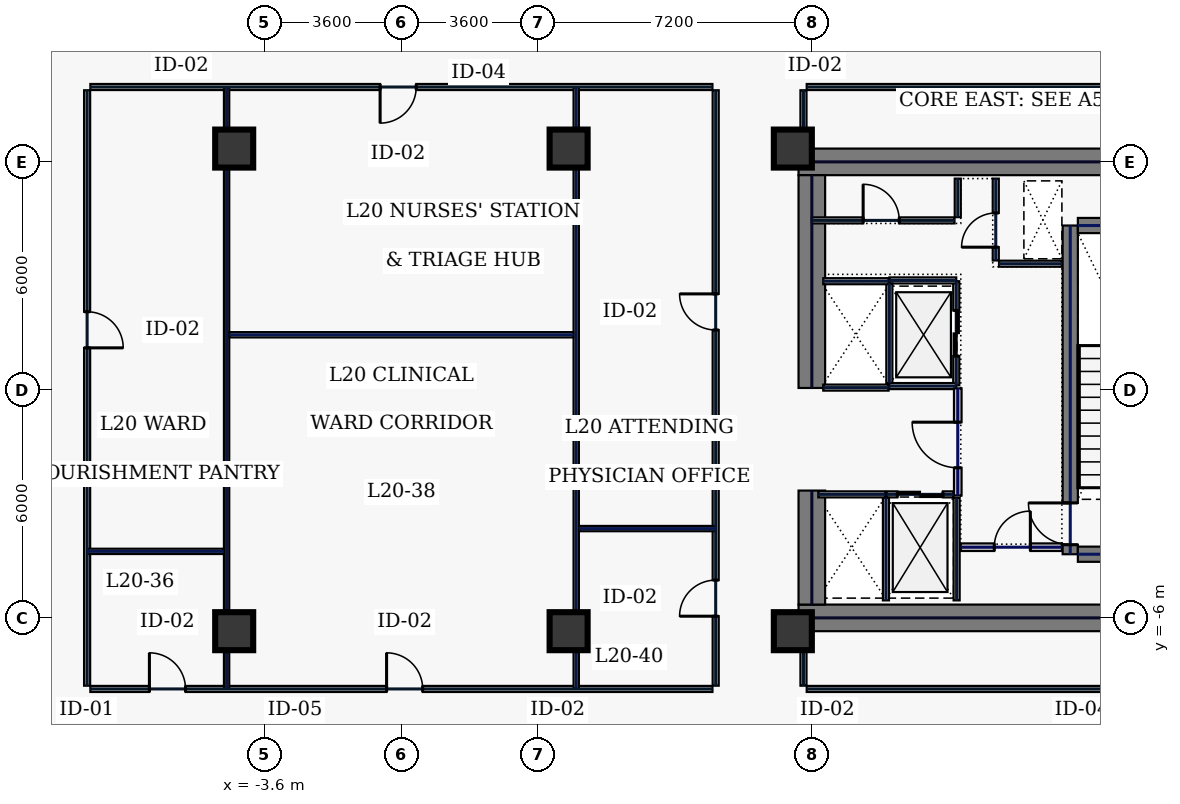
"""IFC4 building model, lengths in metres.
Left out: names, types, materials, properties, quantities, classifications, styles, units other than length and angle.
Written with IfcOpenShell. Run it as: python <this file> out.ifc"""

import sys

from ifc_helpers import new_model, si_unit, direction, frame, frame_2d, origin, origin_2d, place, context, subcontext, project, spatial, rectangle, hollow_rectangle, extrude, element, fill, save


model = new_model("IFC4")
c1 = context("Model", 3, precision=1e-05, world=origin(), true_north=direction((0.0, 1.0)))
c2 = subcontext(c1, "Body", "Model", "MODEL_VIEW")
j1 = project(units=[si_unit("LENGTHUNIT", "METRE"), si_unit("PLANEANGLEUNIT", "RADIAN")], contexts=[c1])
p1 = place(None, origin())
s1 = spatial("IfcSite", under=j1, at=p1, CompositionType="ELEMENT")
p2 = place(p1, origin())
s2 = spatial("IfcBuilding", under=s1, at=p2, CompositionType="ELEMENT")
p3 = place(p2, frame((0.0, 0.0, 93.4)))
s3 = spatial("IfcBuildingStorey", under=s2, at=p3, CompositionType="ELEMENT", Elevation=93.4)
for number, where, z_axis, x_axis in (
    (1, (10.45, 6.0, 0.0), (0.0, 0.0, 1.0), (1.0, 0.0, 0.0)),
    (2, (10.45, -6.0, 0.0), (0.0, 0.0, 1.0), (1.0, 0.0, 0.0)),
):
    element("IfcWall", number, at=place(p3, frame(where, z_axis=z_axis, x_axis=x_axis)), inside=s3, PredefinedType="SHEAR", context=c2, shape_type="SweptSolid", body=[
        extrude(rectangle(XDim=11.55, YDim=0.7, at=frame_2d((5.775, 0.0))), origin(), (0.0, 0.0, 1.0), 3.74),
    ])
p4 = place(p3, frame((10.8, -5.65, 0.0), z_axis=(0.0, 0.0, 1.0), x_axis=(0.0, 1.0, 0.0)))
e3 = element("IfcWall", 3, at=p4, inside=s3, PredefinedType="SHEAR", context=c2, shape_type="SweptSolid", body=[
    extrude(rectangle(XDim=3.0, YDim=0.7, at=frame_2d((1.5, 0.0))), origin(), (0.0, 0.0, 1.0), 3.74),
])
p5 = place(p3, frame((10.8, 0.05, 0.0), z_axis=(0.0, 0.0, 1.0), x_axis=(0.0, 1.0, 0.0)))
e4 = element("IfcWall", 4, at=p5, inside=s3, PredefinedType="SHEAR", context=c2, shape_type="SweptSolid", body=[
    extrude(rectangle(XDim=5.6, YDim=0.7, at=frame_2d((2.8, 0.0))), origin(), (0.0, 0.0, 1.0), 3.74),
])
p6 = place(p3, frame((17.6, -4.325, 0.0), z_axis=(0.0, 0.0, 1.0), x_axis=(0.0, 1.0, 0.0)))
e5 = element("IfcWall", 5, at=p6, inside=s3, PredefinedType="SHEAR", context=c2, shape_type="SweptSolid", body=[
    extrude(rectangle(XDim=8.65, YDim=0.4, at=frame_2d((4.325, 0.0))), origin(), (0.0, 0.0, 1.0), 3.74),
])
p7 = place(p6, frame((0.25, 0.0, 0.0)))
e6 = element("IfcOpeningElement", 6, at=p7, cuts=e5, PredefinedType="OPENING", context=c2, shape_type="SweptSolid", body=[
    extrude(rectangle(XDim=1.1, YDim=2.2, at=frame_2d((0.55, 1.1))), frame((0.0, 0.21, 0.0), z_axis=(0.0, -1.0, 0.0), x_axis=(1.0, 0.0, 0.0)), (0.0, 0.0, 1.0), 0.42),
])
for number, where, z_axis, x_axis in (
    (7, (17.8, -4.325, 0.0), (0.0, 0.0, 1.0), (1.0, 0.0, 0.0)),
    (8, (17.8, 4.325, 0.0), (0.0, 0.0, 1.0), (1.0, 0.0, 0.0)),
):
    element("IfcWall", number, at=place(p3, frame(where, z_axis=z_axis, x_axis=x_axis)), inside=s3, PredefinedType="SHEAR", context=c2, shape_type="SweptSolid", body=[
        extrude(rectangle(XDim=3.4, YDim=0.4, at=frame_2d((1.7, 0.0))), origin(), (0.0, 0.0, 1.0), 3.74),
    ])
for number, where, z_axis, x_axis in (
    (9, (10.3, -6.35, 0.0), (0.0, 0.0, 1.0), (1.0, 0.0, 0.0)),
    (10, (10.3, 6.35, 0.0), (0.0, 0.0, 1.0), (1.0, 0.0, 0.0)),
    (11, (-4.4, -6.35, 0.0), (0.0, 0.0, 1.0), (1.0, 0.0, 0.0)),
    (12, (4.4, -6.35, 0.0), (0.0, 0.0, 1.0), (1.0, 0.0, 0.0)),
    (13, (-4.4, 6.35, 0.0), (0.0, 0.0, 1.0), (1.0, 0.0, 0.0)),
    (14, (4.4, 6.35, 0.0), (0.0, 0.0, 1.0), (1.0, 0.0, 0.0)),
):
    element("IfcColumn", number, at=place(p3, frame(where, z_axis=z_axis, x_axis=x_axis)), inside=s3, PredefinedType="COLUMN", context=c2, shape_type="SweptSolid", body=[
        extrude(hollow_rectangle(XDim=1.0, YDim=1.0, WallThickness=0.045, at=origin_2d()), origin(), (0.0, 0.0, 1.0), 3.74),
    ])
p8 = place(p3, frame((14.6, 0.12, 0.0), z_axis=(0.0, 0.0, 1.0), x_axis=(0.0, 1.0, 0.0)))
e15 = element("IfcWall", 15, at=p8, inside=s3, PredefinedType="PARTITIONING", context=c2, shape_type="SweptSolid", body=[
    extrude(rectangle(XDim=2.74, YDim=0.16, at=frame_2d((1.37, 0.0))), origin(), (0.0, 0.0, 1.0), 3.74),
])
p9 = place(p8, frame((0.77, 0.0, 0.0)))
e16 = element("IfcOpeningElement", 16, at=p9, cuts=e15, PredefinedType="OPENING", context=c2, shape_type="SweptSolid", body=[
    extrude(rectangle(XDim=1.2, YDim=2.2, at=frame_2d((0.6, 1.1))), frame((0.0, 0.09, 0.0), z_axis=(0.0, -1.0, 0.0), x_axis=(1.0, 0.0, 0.0)), (0.0, 0.0, 1.0), 0.18),
])
for number, where, z_axis, x_axis in (
    (17, (12.84, 0.1, 0.0), (0.0, 0.0, 1.0), (1.0, 0.0, 0.0)),
    (18, (12.84, 2.88, 0.0), (0.0, 0.0, 1.0), (1.0, 0.0, 0.0)),
):
    element("IfcWall", number, at=place(p3, frame(where, z_axis=z_axis, x_axis=x_axis)), inside=s3, PredefinedType="PARTITIONING", context=c2, shape_type="SweptSolid", body=[
        extrude(rectangle(XDim=1.76, YDim=0.16, at=frame_2d((0.88, 0.0))), origin(), (0.0, 0.0, 1.0), 3.74),
    ])
p10 = place(p3, frame((12.84, 0.18, 0.0), z_axis=(0.0, 0.0, 1.0), x_axis=(0.0, 1.0, 0.0)))
e19 = element("IfcWall", 19, at=p10, inside=s3, PredefinedType="PARTITIONING", context=c2, shape_type="SweptSolid", body=[
    extrude(rectangle(XDim=2.62, YDim=0.16, at=frame_2d((1.31, 0.0))), origin(), (0.0, 0.0, 1.0), 3.74),
])
p11 = place(p3, frame((12.77, -2.75, 0.0), z_axis=(0.0, 0.0, 1.0), x_axis=(1.0, 0.0, 0.0)))
e20 = element("IfcWall", 20, at=p11, inside=s3, PredefinedType="PARTITIONING", context=c2, shape_type="SweptSolid", body=[
    extrude(rectangle(XDim=1.76, YDim=0.16, at=frame_2d((0.88, 0.0))), origin(), (0.0, 0.0, 1.0), 3.74),
])
p12 = place(p11, frame((0.28, 0.0, 0.0)))
e21 = element("IfcOpeningElement", 21, at=p12, cuts=e20, PredefinedType="OPENING", context=c2, shape_type="SweptSolid", body=[
    extrude(rectangle(XDim=1.2, YDim=2.2, at=frame_2d((0.6, 1.1))), frame((0.0, 0.09, 0.0), z_axis=(0.0, -1.0, 0.0), x_axis=(1.0, 0.0, 0.0)), (0.0, 0.0, 1.0), 0.18),
])
for number, where, z_axis, x_axis in (
    (22, (12.75, -5.54, 0.0), (0.0, 0.0, 1.0), (0.0, 1.0, 0.0)),
    (23, (14.61, -5.54, 0.0), (0.0, 0.0, 1.0), (0.0, 1.0, 0.0)),
):
    element("IfcWall", number, at=place(p3, frame(where, z_axis=z_axis, x_axis=x_axis)), inside=s3, PredefinedType="PARTITIONING", context=c2, shape_type="SweptSolid", body=[
        extrude(rectangle(XDim=2.7, YDim=0.16, at=frame_2d((1.35, 0.0))), origin(), (0.0, 0.0, 1.0), 3.74),
    ])
p13 = place(p3, frame((10.97, -2.75, 0.0), z_axis=(0.0, 0.0, 1.0), x_axis=(1.0, 0.0, 0.0)))
e24 = element("IfcWall", 24, at=p13, inside=s3, PredefinedType="PARTITIONING", context=c2, shape_type="SweptSolid", body=[
    extrude(rectangle(XDim=1.76, YDim=0.16, at=frame_2d((0.88, 0.0))), origin(), (0.0, 0.0, 1.0), 3.74),
])
for number, where, z_axis, x_axis in (
    (25, (11.1, 0.06, 0.0), (0.0, 0.0, 1.0), (1.0, 0.0, 0.0)),
    (26, (11.1, 2.86, 0.0), (0.0, 0.0, 1.0), (1.0, 0.0, 0.0)),
):
    element("IfcWall", number, at=place(p3, frame(where, z_axis=z_axis, x_axis=x_axis)), inside=s3, PredefinedType="PARTITIONING", context=c2, shape_type="SweptSolid", body=[
        extrude(rectangle(XDim=1.72, YDim=0.16, at=frame_2d((0.86, 0.0))), origin(), (0.0, 0.0, 1.0), 3.74),
    ])
p14 = place(p3, frame((15.64, 3.405, 0.0), z_axis=(0.0, 0.0, 1.0), x_axis=(0.0, 1.0, 0.0)))
e27 = element("IfcWall", 27, at=p14, inside=s3, PredefinedType="PARTITIONING", context=c2, shape_type="SweptSolid", body=[
    extrude(rectangle(XDim=2.155, YDim=0.16, at=frame_2d((1.078, 0.0))), origin(), (0.0, 0.0, 1.0), 3.74),
])
p15 = place(p14, frame((0.35, 0.0, 0.0)))
e28 = element("IfcOpeningElement", 28, at=p15, cuts=e27, PredefinedType="OPENING", context=c2, shape_type="SweptSolid", body=[
    extrude(rectangle(XDim=0.9, YDim=2.2, at=frame_2d((0.45, 1.1))), frame((0.0, 0.09, 0.0), z_axis=(0.0, -1.0, 0.0), x_axis=(1.0, 0.0, 0.0)), (0.0, 0.0, 1.0), 0.18),
])
p16 = place(p3, frame((15.725, 3.32, 0.0), z_axis=(0.0, 0.0, 1.0), x_axis=(1.0, 0.0, 0.0)))
e29 = element("IfcWall", 29, at=p16, inside=s3, PredefinedType="PARTITIONING", context=c2, shape_type="SweptSolid", body=[
    extrude(rectangle(XDim=1.655, YDim=0.16, at=frame_2d((0.827, 0.0))), origin(), (0.0, 0.0, 1.0), 3.74),
])
p17 = place(p3, frame((14.72, -4.14, 0.0), z_axis=(0.0, 0.0, 1.0), x_axis=(1.0, 0.0, 0.0)))
e30 = element("IfcWall", 30, at=p17, inside=s3, PredefinedType="SOLIDWALL", context=c2, shape_type="SweptSolid", body=[
    extrude(rectangle(XDim=2.66, YDim=0.2, at=frame_2d((1.33, 0.0))), origin(), (0.0, 0.0, 1.0), 3.74),
])
p18 = place(p17, frame((0.88, 0.0, 0.0)))
e31 = element("IfcOpeningElement", 31, at=p18, cuts=e30, PredefinedType="OPENING", context=c2, shape_type="SweptSolid", body=[
    extrude(rectangle(XDim=0.95, YDim=2.2, at=frame_2d((0.475, 1.1))), frame((0.0, 0.11, 0.0), z_axis=(0.0, -1.0, 0.0), x_axis=(1.0, 0.0, 0.0)), (0.0, 0.0, 1.0), 0.22),
])
p19 = place(p3, frame((10.8, 4.46, 0.0), z_axis=(0.0, 0.0, 1.0), x_axis=(1.0, 0.0, 0.0)))
e32 = element("IfcWall", 32, at=p19, inside=s3, PredefinedType="PARTITIONING", context=c2, shape_type="SweptSolid", body=[
    extrude(rectangle(XDim=3.755, YDim=0.16, at=frame_2d((1.877, 0.0))), origin(), (0.0, 0.0, 1.0), 3.74),
])
p20 = place(p19, frame((1.35, 0.0, 0.0)))
e33 = element("IfcOpeningElement", 33, at=p20, cuts=e32, PredefinedType="OPENING", context=c2, shape_type="SweptSolid", body=[
    extrude(rectangle(XDim=0.95, YDim=2.2, at=frame_2d((0.475, 1.1))), frame((0.0, 0.09, 0.0), z_axis=(0.0, -1.0, 0.0), x_axis=(1.0, 0.0, 0.0)), (0.0, 0.0, 1.0), 0.18),
])
p21 = place(p3, frame((14.64, 4.545, 0.0), z_axis=(0.0, 0.0, 1.0), x_axis=(0.0, 1.0, 0.0)))
e34 = element("IfcWall", 34, at=p21, inside=s3, PredefinedType="PARTITIONING", context=c2, shape_type="SweptSolid", body=[
    extrude(rectangle(XDim=1.015, YDim=0.16, at=frame_2d((0.508, 0.0))), origin(), (0.0, 0.0, 1.0), 3.74),
])
p22 = place(p3, frame((14.64, -2.78, 0.0), z_axis=(0.0, 0.0, 1.0), x_axis=(0.0, 1.0, 0.0)))
e35 = element("IfcWall", 35, at=p22, inside=s3, PredefinedType="SOLIDWALL", context=c2, shape_type="SweptSolid", body=[
    extrude(rectangle(XDim=2.82, YDim=0.2, at=frame_2d((1.41, 0.0))), origin(), (0.0, 0.0, 1.0), 3.74),
])
p23 = place(p22, frame((0.73, 0.0, 0.0)))
e36 = element("IfcOpeningElement", 36, at=p23, cuts=e35, PredefinedType="OPENING", context=c2, shape_type="SweptSolid", body=[
    extrude(rectangle(XDim=1.2, YDim=2.2, at=frame_2d((0.6, 1.1))), frame((0.0, 0.11, 0.0), z_axis=(0.0, -1.0, 0.0), x_axis=(1.0, 0.0, 0.0)), (0.0, 0.0, 1.0), 0.22),
])
p24 = place(p3, frame((25.235, 7.97, 0.0), z_axis=(0.0, 0.0, 1.0), x_axis=(-1.0, 0.0, 0.0)))
e37 = element("IfcWall", 37, at=p24, inside=s3, PredefinedType="PARTITIONING", context=c2, shape_type="SweptSolid", body=[
    extrude(rectangle(XDim=14.57, YDim=0.16, at=frame_2d((7.285, 0.0))), origin(), (0.0, 0.0, 1.0), 3.74),
])
p25 = place(p3, frame((10.58, 7.885, 0.0), z_axis=(0.0, 0.0, 1.0), x_axis=(0.0, -1.0, 0.0)))
e38 = element("IfcWall", 38, at=p25, inside=s3, PredefinedType="PARTITIONING", context=c2, shape_type="SweptSolid", body=[
    extrude(rectangle(XDim=1.465, YDim=0.16, at=frame_2d((0.732, 0.0))), origin(), (0.0, 0.0, 1.0), 3.74),
])
p26 = place(p3, frame((10.58, -6.42, 0.0), z_axis=(0.0, 0.0, 1.0), x_axis=(0.0, -1.0, 0.0)))
e39 = element("IfcWall", 39, at=p26, inside=s3, PredefinedType="PARTITIONING", context=c2, shape_type="SweptSolid", body=[
    extrude(rectangle(XDim=1.365, YDim=0.16, at=frame_2d((0.683, 0.0))), origin(), (0.0, 0.0, 1.0), 3.74),
])
p27 = place(p3, frame((10.665, -7.87, 0.0), z_axis=(0.0, 0.0, 1.0), x_axis=(1.0, 0.0, 0.0)))
e40 = element("IfcWall", 40, at=p27, inside=s3, PredefinedType="PARTITIONING", context=c2, shape_type="SweptSolid", body=[
    extrude(rectangle(XDim=14.57, YDim=0.16, at=frame_2d((7.285, 0.0))), origin(), (0.0, 0.0, 1.0), 3.74),
])
p28 = place(p3, frame((8.27, -7.785, 0.0), z_axis=(0.0, 0.0, 1.0), x_axis=(0.0, 1.0, 0.0)))
e41 = element("IfcWall", 41, at=p28, inside=s3, PredefinedType="PARTITIONING", context=c2, shape_type="SweptSolid", body=[
    extrude(rectangle(XDim=15.67, YDim=0.16, at=frame_2d((7.835, 0.0))), origin(), (0.0, 0.0, 1.0), 3.74),
])
p29 = place(p28, frame((1.829, 0.0, 0.0)))
e42 = element("IfcOpeningElement", 42, at=p29, cuts=e41, PredefinedType="OPENING", context=c2, shape_type="SweptSolid", body=[
    extrude(rectangle(XDim=0.95, YDim=2.2, at=frame_2d((0.475, 1.1))), frame((0.0, 0.09, 0.0), z_axis=(0.0, -1.0, 0.0), x_axis=(1.0, 0.0, 0.0)), (0.0, 0.0, 1.0), 0.18),
])
p30 = place(p28, frame((9.361, 0.0, 0.0)))
e43 = element("IfcOpeningElement", 43, at=p30, cuts=e41, PredefinedType="OPENING", context=c2, shape_type="SweptSolid", body=[
    extrude(rectangle(XDim=0.95, YDim=2.2, at=frame_2d((0.475, 1.1))), frame((0.0, 0.09, 0.0), z_axis=(0.0, -1.0, 0.0), x_axis=(1.0, 0.0, 0.0)), (0.0, 0.0, 1.0), 0.18),
])
p31 = place(p3, frame((8.185, 7.97, 0.0), z_axis=(0.0, 0.0, 1.0), x_axis=(-1.0, 0.0, 0.0)))
e44 = element("IfcWall", 44, at=p31, inside=s3, PredefinedType="PARTITIONING", context=c2, shape_type="SweptSolid", body=[
    extrude(rectangle(XDim=16.37, YDim=0.16, at=frame_2d((8.185, 0.0))), origin(), (0.0, 0.0, 1.0), 3.74),
])
p32 = place(p31, frame((7.795, 0.0, 0.0)))
e45 = element("IfcOpeningElement", 45, at=p32, cuts=e44, PredefinedType="OPENING", context=c2, shape_type="SweptSolid", body=[
    extrude(rectangle(XDim=0.95, YDim=2.2, at=frame_2d((0.475, 1.1))), frame((0.0, 0.09, 0.0), z_axis=(0.0, -1.0, 0.0), x_axis=(1.0, 0.0, 0.0)), (0.0, 0.0, 1.0), 0.18),
])
p33 = place(p3, frame((-8.27, 7.885, 0.0), z_axis=(0.0, 0.0, 1.0), x_axis=(0.0, -1.0, 0.0)))
e46 = element("IfcWall", 46, at=p33, inside=s3, PredefinedType="PARTITIONING", context=c2, shape_type="SweptSolid", body=[
    extrude(rectangle(XDim=15.67, YDim=0.16, at=frame_2d((7.835, 0.0))), origin(), (0.0, 0.0, 1.0), 3.74),
])
p34 = place(p33, frame((5.829, 0.0, 0.0)))
e47 = element("IfcOpeningElement", 47, at=p34, cuts=e46, PredefinedType="OPENING", context=c2, shape_type="SweptSolid", body=[
    extrude(rectangle(XDim=0.95, YDim=2.2, at=frame_2d((0.475, 1.1))), frame((0.0, 0.09, 0.0), z_axis=(0.0, -1.0, 0.0), x_axis=(1.0, 0.0, 0.0)), (0.0, 0.0, 1.0), 0.18),
])
p35 = place(p3, frame((-8.185, -7.87, 0.0), z_axis=(0.0, 0.0, 1.0), x_axis=(1.0, 0.0, 0.0)))
e48 = element("IfcWall", 48, at=p35, inside=s3, PredefinedType="PARTITIONING", context=c2, shape_type="SweptSolid", body=[
    extrude(rectangle(XDim=16.37, YDim=0.16, at=frame_2d((8.185, 0.0))), origin(), (0.0, 0.0, 1.0), 3.74),
])
p36 = place(p35, frame((1.554, 0.0, 0.0)))
e49 = element("IfcOpeningElement", 49, at=p36, cuts=e48, PredefinedType="OPENING", context=c2, shape_type="SweptSolid", body=[
    extrude(rectangle(XDim=0.95, YDim=2.2, at=frame_2d((0.475, 1.1))), frame((0.0, 0.09, 0.0), z_axis=(0.0, -1.0, 0.0), x_axis=(1.0, 0.0, 0.0)), (0.0, 0.0, 1.0), 0.18),
])
p37 = place(p35, frame((7.795, 0.0, 0.0)))
e50 = element("IfcOpeningElement", 50, at=p37, cuts=e48, PredefinedType="OPENING", context=c2, shape_type="SweptSolid", body=[
    extrude(rectangle(XDim=0.95, YDim=2.2, at=frame_2d((0.475, 1.1))), frame((0.0, 0.09, 0.0), z_axis=(0.0, -1.0, 0.0), x_axis=(1.0, 0.0, 0.0)), (0.0, 0.0, 1.0), 0.18),
])
for number, where, z_axis, x_axis in (
    (51, (-4.6, -7.865, 0.0), (0.0, 0.0, 1.0), (0.0, 1.0, 0.0)),
    (52, (4.6, -7.865, 0.0), (0.0, 0.0, 1.0), (0.0, 1.0, 0.0)),
):
    element("IfcWall", number, at=place(p3, frame(where, z_axis=z_axis, x_axis=x_axis)), inside=s3, PredefinedType="PARTITIONING", context=c2, shape_type="SweptSolid", body=[
        extrude(rectangle(XDim=15.83, YDim=0.14, at=frame_2d((7.915, 0.0))), origin(), (0.0, 0.0, 1.0), 2.935),
    ])
p38 = place(p3, frame((-4.525, 1.45, 0.0), z_axis=(0.0, 0.0, 1.0), x_axis=(1.0, 0.0, 0.0)))
e53 = element("IfcWall", 53, at=p38, inside=s3, PredefinedType="PARTITIONING", context=c2, shape_type="SweptSolid", body=[
    extrude(rectangle(XDim=9.05, YDim=0.14, at=frame_2d((4.525, 0.0))), origin(), (0.0, 0.0, 1.0), 3.74),
])
for number, where, z_axis, x_axis in (
    (54, (-8.265, -4.25, 0.0), (0.0, 0.0, 1.0), (1.0, 0.0, 0.0)),
    (55, (4.675, -3.65, 0.0), (0.0, 0.0, 1.0), (1.0, 0.0, 0.0)),
):
    element("IfcWall", number, at=place(p3, frame(where, z_axis=z_axis, x_axis=x_axis)), inside=s3, PredefinedType="PARTITIONING", context=c2, shape_type="SweptSolid", body=[
        extrude(rectangle(XDim=3.59, YDim=0.14, at=frame_2d((1.795, 0.0))), origin(), (0.0, 0.0, 1.0), 3.74),
    ])
p39 = place(p7, origin())
e56 = element("IfcDoor", 56, at=p39, inside=s3, OperationType="SINGLE_SWING_RIGHT", PredefinedType="DOOR", context=c2, shape_type="SweptSolid", body=[
    extrude(rectangle(XDim=1.1, YDim=2.2, at=frame_2d((0.55, 1.1))), frame((0.0, 0.025, 0.0), z_axis=(0.0, -1.0, 0.0), x_axis=(1.0, 0.0, 0.0)), (0.0, 0.0, 1.0), 0.05),
])
fill(e6, e56)
p40 = place(p9, origin())
e57 = element("IfcDoor", 57, at=p40, inside=s3, OperationType="SLIDING_TO_LEFT", PredefinedType="DOOR", context=c2, shape_type="SweptSolid", body=[
    extrude(rectangle(XDim=1.2, YDim=2.2, at=frame_2d((0.6, 1.1))), frame((0.0, 0.025, 0.0), z_axis=(0.0, -1.0, 0.0), x_axis=(1.0, 0.0, 0.0)), (0.0, 0.0, 1.0), 0.05),
])
fill(e16, e57)
p41 = place(p12, origin())
e58 = element("IfcDoor", 58, at=p41, inside=s3, OperationType="SLIDING_TO_LEFT", PredefinedType="DOOR", context=c2, shape_type="SweptSolid", body=[
    extrude(rectangle(XDim=1.2, YDim=2.2, at=frame_2d((0.6, 1.1))), frame((0.0, 0.025, 0.0), z_axis=(0.0, -1.0, 0.0), x_axis=(1.0, 0.0, 0.0)), (0.0, 0.0, 1.0), 0.05),
])
fill(e21, e58)
p42 = place(p15, origin())
e59 = element("IfcDoor", 59, at=p42, inside=s3, OperationType="SINGLE_SWING_LEFT", PredefinedType="DOOR", context=c2, shape_type="SweptSolid", body=[
    extrude(rectangle(XDim=0.9, YDim=2.2, at=frame_2d((0.45, 1.1))), frame((0.0, 0.025, 0.0), z_axis=(0.0, -1.0, 0.0), x_axis=(1.0, 0.0, 0.0)), (0.0, 0.0, 1.0), 0.05),
])
fill(e28, e59)
p43 = place(p18, origin())
e60 = element("IfcDoor", 60, at=p43, inside=s3, OperationType="SINGLE_SWING_RIGHT", PredefinedType="DOOR", context=c2, shape_type="SweptSolid", body=[
    extrude(rectangle(XDim=0.95, YDim=2.2, at=frame_2d((0.475, 1.1))), frame((0.0, 0.025, 0.0), z_axis=(0.0, -1.0, 0.0), x_axis=(1.0, 0.0, 0.0)), (0.0, 0.0, 1.0), 0.05),
])
fill(e31, e60)
p44 = place(p20, origin())
e61 = element("IfcDoor", 61, at=p44, inside=s3, OperationType="SINGLE_SWING_LEFT", PredefinedType="DOOR", context=c2, shape_type="SweptSolid", body=[
    extrude(rectangle(XDim=0.95, YDim=2.2, at=frame_2d((0.475, 1.1))), frame((0.0, 0.025, 0.0), z_axis=(0.0, -1.0, 0.0), x_axis=(1.0, 0.0, 0.0)), (0.0, 0.0, 1.0), 0.05),
])
fill(e33, e61)
p45 = place(p23, origin())
e62 = element("IfcDoor", 62, at=p45, inside=s3, OperationType="SINGLE_SWING_RIGHT", PredefinedType="DOOR", context=c2, shape_type="SweptSolid", body=[
    extrude(rectangle(XDim=1.2, YDim=2.2, at=frame_2d((0.6, 1.1))), frame((0.0, 0.025, 0.0), z_axis=(0.0, -1.0, 0.0), x_axis=(1.0, 0.0, 0.0)), (0.0, 0.0, 1.0), 0.05),
])
fill(e36, e62)
p46 = place(p36, origin())
e63 = element("IfcDoor", 63, at=p46, inside=s3, OperationType="SINGLE_SWING_LEFT", PredefinedType="DOOR", context=c2, shape_type="SweptSolid", body=[
    extrude(rectangle(XDim=0.95, YDim=2.2, at=frame_2d((0.475, 1.1))), frame((0.0, 0.025, 0.0), z_axis=(0.0, -1.0, 0.0), x_axis=(1.0, 0.0, 0.0)), (0.0, 0.0, 1.0), 0.05),
])
fill(e49, e63)
p47 = place(p34, origin())
e64 = element("IfcDoor", 64, at=p47, inside=s3, OperationType="SINGLE_SWING_RIGHT", PredefinedType="DOOR", context=c2, shape_type="SweptSolid", body=[
    extrude(rectangle(XDim=0.95, YDim=2.2, at=frame_2d((0.475, 1.1))), frame((0.0, 0.025, 0.0), z_axis=(0.0, -1.0, 0.0), x_axis=(1.0, 0.0, 0.0)), (0.0, 0.0, 1.0), 0.05),
])
fill(e47, e64)
p48 = place(p37, origin())
e65 = element("IfcDoor", 65, at=p48, inside=s3, OperationType="SINGLE_SWING_LEFT", PredefinedType="DOOR", context=c2, shape_type="SweptSolid", body=[
    extrude(rectangle(XDim=0.95, YDim=2.2, at=frame_2d((0.475, 1.1))), frame((0.0, 0.025, 0.0), z_axis=(0.0, -1.0, 0.0), x_axis=(1.0, 0.0, 0.0)), (0.0, 0.0, 1.0), 0.05),
])
fill(e50, e65)
p49 = place(p32, origin())
e66 = element("IfcDoor", 66, at=p49, inside=s3, OperationType="SINGLE_SWING_RIGHT", PredefinedType="DOOR", context=c2, shape_type="SweptSolid", body=[
    extrude(rectangle(XDim=0.95, YDim=2.2, at=frame_2d((0.475, 1.1))), frame((0.0, 0.025, 0.0), z_axis=(0.0, -1.0, 0.0), x_axis=(1.0, 0.0, 0.0)), (0.0, 0.0, 1.0), 0.05),
])
fill(e45, e66)
p50 = place(p29, origin())
e67 = element("IfcDoor", 67, at=p50, inside=s3, OperationType="SINGLE_SWING_LEFT", PredefinedType="DOOR", context=c2, shape_type="SweptSolid", body=[
    extrude(rectangle(XDim=0.95, YDim=2.2, at=frame_2d((0.475, 1.1))), frame((0.0, 0.025, 0.0), z_axis=(0.0, -1.0, 0.0), x_axis=(1.0, 0.0, 0.0)), (0.0, 0.0, 1.0), 0.05),
])
fill(e42, e67)
p51 = place(p30, origin())
e68 = element("IfcDoor", 68, at=p51, inside=s3, OperationType="SINGLE_SWING_RIGHT", PredefinedType="DOOR", context=c2, shape_type="SweptSolid", body=[
    extrude(rectangle(XDim=0.95, YDim=2.2, at=frame_2d((0.475, 1.1))), frame((0.0, 0.025, 0.0), z_axis=(0.0, -1.0, 0.0), x_axis=(1.0, 0.0, 0.0)), (0.0, 0.0, 1.0), 0.05),
])
fill(e43, e68)
save(model, sys.argv[1])
